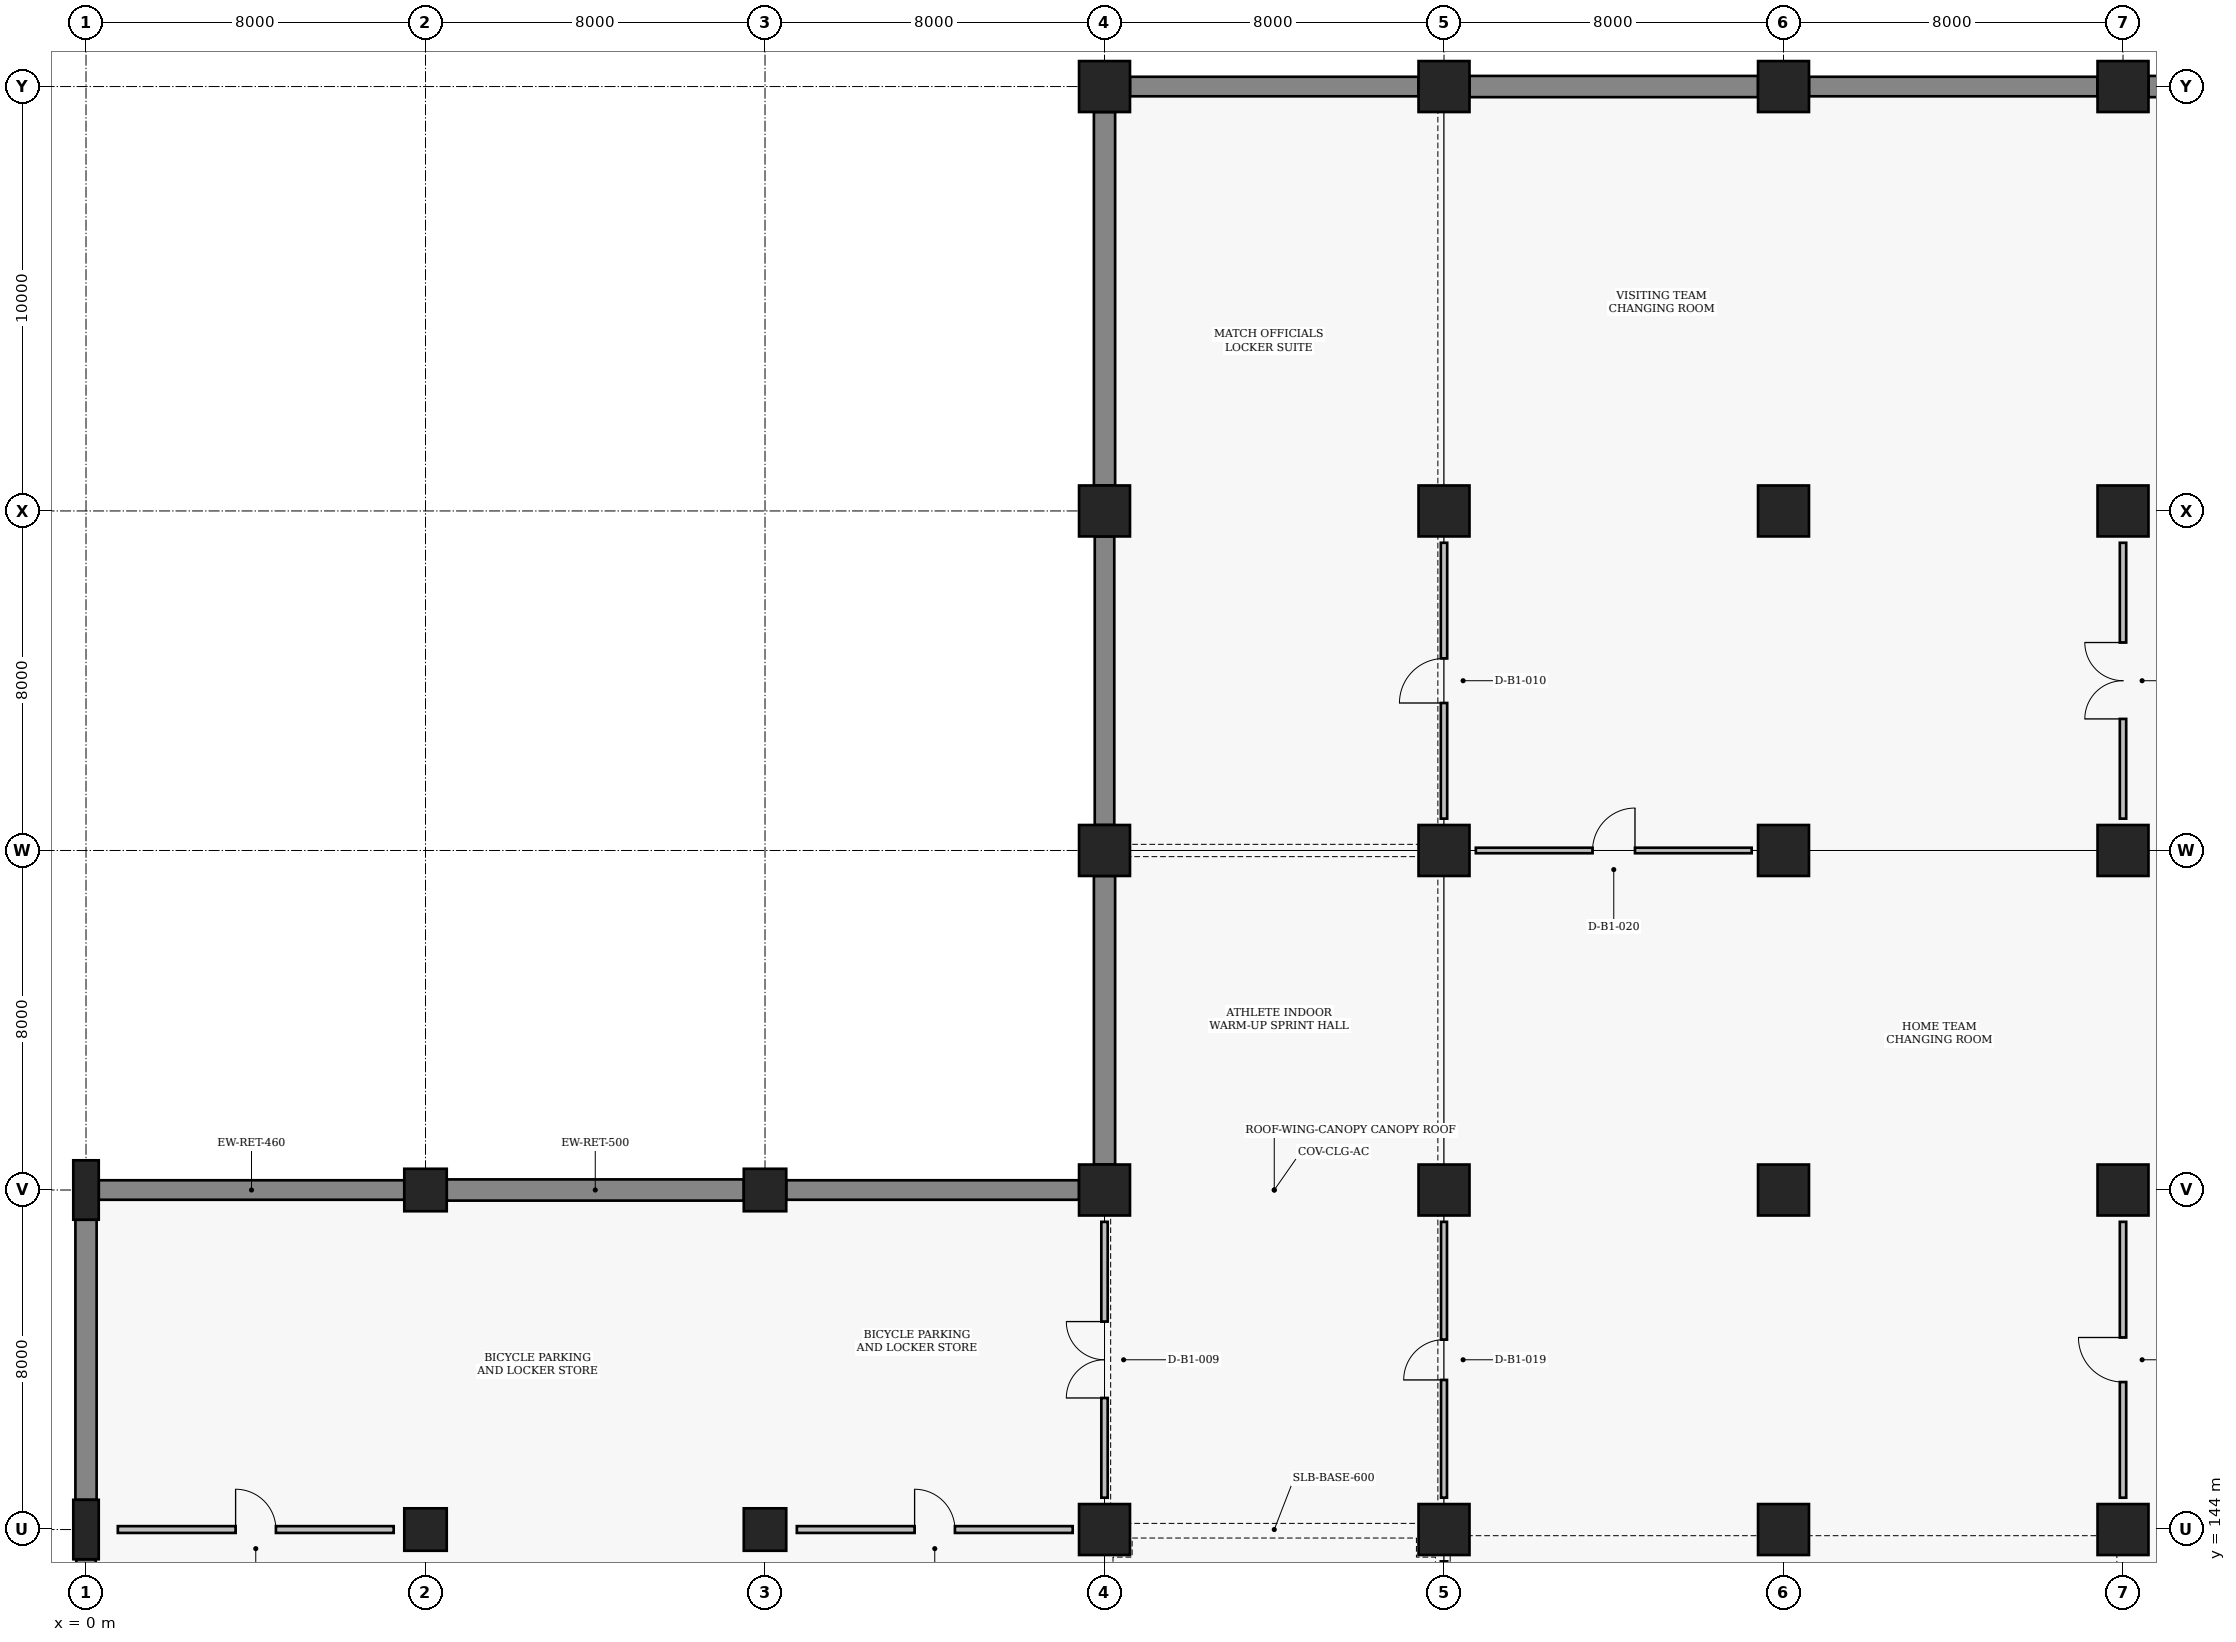
"""IFC4 building model, lengths in metres.
Left out: names, types, materials, properties, quantities, classifications, styles, units other than length and angle.
Written with IfcOpenShell. Run it as: python <this file> out.ifc"""

import sys

from ifc_helpers import new_model, si_unit, direction, frame, frame_2d, origin, origin_2d, place, context, subcontext, project, spatial, rectangle, circle, extrude, element, fill, save


model = new_model("IFC4")
c1 = context("Model", 3, precision=1e-05, world=origin(), true_north=direction((0.0, 1.0)))
c2 = subcontext(c1, "Body", "Model", "MODEL_VIEW")
j1 = project(units=[si_unit("LENGTHUNIT", "METRE"), si_unit("PLANEANGLEUNIT", "RADIAN")], contexts=[c1])
p1 = place(None, origin())
s1 = spatial("IfcSite", under=j1, at=p1, CompositionType="ELEMENT")
p2 = place(p1, origin())
s2 = spatial("IfcBuilding", under=s1, at=p2, CompositionType="ELEMENT")
p3 = place(p2, frame((0.0, 0.0, -5.4)))
s3 = spatial("IfcBuildingStorey", under=s2, at=p3, CompositionType="ELEMENT", Elevation=-5.4)
for number, where, z_axis, x_axis in (
    (1, (0.0, 144.0, 0.0), (0.0, 0.0, 1.0), (1.0, 0.0, 0.0)),
    (2, (0.0, 152.0, 0.0), (0.0, 0.0, 1.0), (1.0, 0.0, 0.0)),
):
    element("IfcColumn", number, at=place(p3, frame(where, z_axis=z_axis, x_axis=x_axis)), inside=s3, PredefinedType="PILASTER", context=c2, shape_type="SweptSolid", body=[
        extrude(rectangle(XDim=0.6, YDim=1.4, at=origin_2d()), origin(), (0.0, 0.0, 1.0), 5.4),
    ])
for number, where, z_axis, x_axis in (
    (3, (8.0, 144.0, 0.0), (0.0, 0.0, 1.0), (1.0, 0.0, 0.0)),
    (4, (8.0, 152.0, 0.0), (0.0, 0.0, 1.0), (1.0, 0.0, 0.0)),
    (5, (16.0, 144.0, 0.0), (0.0, 0.0, 1.0), (1.0, 0.0, 0.0)),
    (6, (16.0, 152.0, 0.0), (0.0, 0.0, 1.0), (1.0, 0.0, 0.0)),
):
    element("IfcColumn", number, at=place(p3, frame(where, z_axis=z_axis, x_axis=x_axis)), inside=s3, PredefinedType="COLUMN", context=c2, shape_type="SweptSolid", body=[
        extrude(circle(Radius=0.5, at=origin_2d()), origin(), (0.0, 0.0, 1.0), 5.4),
    ])
for number, where, z_axis, x_axis in (
    (7, (24.0, 144.0, 0.0), (0.0, 0.0, 1.0), (1.0, 0.0, 0.0)),
    (8, (24.0, 152.0, 0.0), (0.0, 0.0, 1.0), (1.0, 0.0, 0.0)),
    (9, (24.0, 160.0, 0.0), (0.0, 0.0, 1.0), (1.0, 0.0, 0.0)),
    (10, (24.0, 168.0, 0.0), (0.0, 0.0, 1.0), (1.0, 0.0, 0.0)),
    (11, (24.0, 178.0, 0.0), (0.0, 0.0, 1.0), (1.0, 0.0, 0.0)),
    (12, (32.0, 144.0, 0.0), (0.0, 0.0, 1.0), (1.0, 0.0, 0.0)),
    (13, (32.0, 152.0, 0.0), (0.0, 0.0, 1.0), (1.0, 0.0, 0.0)),
    (14, (32.0, 160.0, 0.0), (0.0, 0.0, 1.0), (1.0, 0.0, 0.0)),
    (15, (32.0, 168.0, 0.0), (0.0, 0.0, 1.0), (1.0, 0.0, 0.0)),
    (16, (32.0, 178.0, 0.0), (0.0, 0.0, 1.0), (1.0, 0.0, 0.0)),
    (17, (40.0, 144.0, 0.0), (0.0, 0.0, 1.0), (1.0, 0.0, 0.0)),
    (18, (40.0, 152.0, 0.0), (0.0, 0.0, 1.0), (1.0, 0.0, 0.0)),
    (19, (40.0, 160.0, 0.0), (0.0, 0.0, 1.0), (1.0, 0.0, 0.0)),
    (20, (40.0, 168.0, 0.0), (0.0, 0.0, 1.0), (1.0, 0.0, 0.0)),
    (21, (40.0, 178.0, 0.0), (0.0, 0.0, 1.0), (1.0, 0.0, 0.0)),
    (22, (48.0, 144.0, 0.0), (0.0, 0.0, 1.0), (1.0, 0.0, 0.0)),
    (23, (48.0, 152.0, 0.0), (0.0, 0.0, 1.0), (1.0, 0.0, 0.0)),
    (24, (48.0, 160.0, 0.0), (0.0, 0.0, 1.0), (1.0, 0.0, 0.0)),
    (25, (48.0, 168.0, 0.0), (0.0, 0.0, 1.0), (1.0, 0.0, 0.0)),
    (26, (48.0, 178.0, 0.0), (0.0, 0.0, 1.0), (1.0, 0.0, 0.0)),
):
    element("IfcColumn", number, at=place(p3, frame(where, z_axis=z_axis, x_axis=x_axis)), inside=s3, PredefinedType="COLUMN", context=c2, shape_type="SweptSolid", body=[
        extrude(rectangle(XDim=1.2, YDim=1.2, at=origin_2d()), origin(), (0.0, 0.0, 1.0), 5.4),
    ])
p4 = place(p3, frame((0.0, 136.7, 0.0), z_axis=(0.0, 0.0, 1.0), x_axis=(0.0, 1.0, 0.0)))
e27 = element("IfcWall", 27, at=p4, inside=s3, PredefinedType="STANDARD", context=c2, shape_type="SweptSolid", body=[
    extrude(rectangle(XDim=6.6, YDim=0.46, at=frame_2d((3.3, 0.0))), origin(), (0.0, 0.0, 1.0), 4.24),
])
p5 = place(p3, frame((0.3, 152.0, 0.0), z_axis=(0.0, 0.0, 1.0), x_axis=(1.0, 0.0, 0.0)))
e28 = element("IfcWall", 28, at=p5, inside=s3, PredefinedType="STANDARD", context=c2, shape_type="SweptSolid", body=[
    extrude(rectangle(XDim=7.2, YDim=0.46, at=frame_2d((3.6, 0.0))), origin(), (0.0, 0.0, 1.0), 4.24),
])
p6 = place(p3, frame((0.0, 144.7, 0.0), z_axis=(0.0, 0.0, 1.0), x_axis=(0.0, 1.0, 0.0)))
e29 = element("IfcWall", 29, at=p6, inside=s3, PredefinedType="STANDARD", context=c2, shape_type="SweptSolid", body=[
    extrude(rectangle(XDim=6.6, YDim=0.5, at=frame_2d((3.3, 0.0))), origin(), (0.0, 0.0, 1.0), 4.24),
])
p7 = place(p3, frame((8.5, 152.0, 0.0), z_axis=(0.0, 0.0, 1.0), x_axis=(1.0, 0.0, 0.0)))
e30 = element("IfcWall", 30, at=p7, inside=s3, PredefinedType="STANDARD", context=c2, shape_type="SweptSolid", body=[
    extrude(rectangle(XDim=7.0, YDim=0.5, at=frame_2d((3.5, 0.0))), origin(), (0.0, 0.0, 1.0), 4.34),
])
p8 = place(p3, frame((16.5, 152.0, 0.0), z_axis=(0.0, 0.0, 1.0), x_axis=(1.0, 0.0, 0.0)))
e31 = element("IfcWall", 31, at=p8, inside=s3, PredefinedType="STANDARD", context=c2, shape_type="SweptSolid", body=[
    extrude(rectangle(XDim=6.9, YDim=0.46, at=frame_2d((3.45, 0.0))), origin(), (0.0, 0.0, 1.0), 4.24),
])
p9 = place(p3, frame((24.0, 152.6, 0.0), z_axis=(0.0, 0.0, 1.0), x_axis=(0.0, 1.0, 0.0)))
e32 = element("IfcWall", 32, at=p9, inside=s3, PredefinedType="STANDARD", context=c2, shape_type="SweptSolid", body=[
    extrude(rectangle(XDim=6.8, YDim=0.5, at=frame_2d((3.4, 0.0))), origin(), (0.0, 0.0, 1.0), 4.24),
])
for number, where, z_axis, x_axis in (
    (33, (24.0, 160.6, 0.0), (0.0, 0.0, 1.0), (0.0, 1.0, 0.0)),
    (34, (24.6, 178.0, 0.0), (0.0, 0.0, 1.0), (1.0, 0.0, 0.0)),
):
    element("IfcWall", number, at=place(p3, frame(where, z_axis=z_axis, x_axis=x_axis)), inside=s3, PredefinedType="STANDARD", context=c2, shape_type="SweptSolid", body=[
        extrude(rectangle(XDim=6.8, YDim=0.46, at=frame_2d((3.4, 0.0))), origin(), (0.0, 0.0, 1.0), 4.24),
    ])
p10 = place(p3, frame((24.0, 168.6, 0.0), z_axis=(0.0, 0.0, 1.0), x_axis=(0.0, 1.0, 0.0)))
e35 = element("IfcWall", 35, at=p10, inside=s3, PredefinedType="STANDARD", context=c2, shape_type="SweptSolid", body=[
    extrude(rectangle(XDim=8.8, YDim=0.5, at=frame_2d((4.4, 0.0))), origin(), (0.0, 0.0, 1.0), 4.24),
])
p11 = place(p3, frame((32.6, 178.0, 0.0), z_axis=(0.0, 0.0, 1.0), x_axis=(1.0, 0.0, 0.0)))
e36 = element("IfcWall", 36, at=p11, inside=s3, PredefinedType="STANDARD", context=c2, shape_type="SweptSolid", body=[
    extrude(rectangle(XDim=6.8, YDim=0.5, at=frame_2d((3.4, 0.0))), origin(), (0.0, 0.0, 1.0), 4.34),
])
p12 = place(p3, frame((40.6, 178.0, 0.0), z_axis=(0.0, 0.0, 1.0), x_axis=(1.0, 0.0, 0.0)))
e37 = element("IfcWall", 37, at=p12, inside=s3, PredefinedType="STANDARD", context=c2, shape_type="SweptSolid", body=[
    extrude(rectangle(XDim=6.8, YDim=0.46, at=frame_2d((3.4, 0.0))), origin(), (0.0, 0.0, 1.0), 4.34),
])
p13 = place(p3, frame((48.6, 178.0, 0.0), z_axis=(0.0, 0.0, 1.0), x_axis=(1.0, 0.0, 0.0)))
e38 = element("IfcWall", 38, at=p13, inside=s3, PredefinedType="STANDARD", context=c2, shape_type="SweptSolid", body=[
    extrude(rectangle(XDim=6.8, YDim=0.5, at=frame_2d((3.4, 0.0))), origin(), (0.0, 0.0, 1.0), 4.34),
])
p14 = place(p3, frame((24.0, 144.75, 0.0), z_axis=(0.0, 0.0, 1.0), x_axis=(0.0, 1.0, 0.0)))
e39 = element("IfcWall", 39, at=p14, inside=s3, PredefinedType="PARTITIONING", context=c2, shape_type="SweptSolid", body=[
    extrude(rectangle(XDim=6.5, YDim=0.15, at=frame_2d((3.25, 0.0))), origin(), (0.0, 0.0, 1.0), 3.69),
])
p15 = place(p14, frame((2.35, 0.0, 0.0)))
e40 = element("IfcOpeningElement", 40, at=p15, cuts=e39, PredefinedType="OPENING", context=c2, shape_type="SweptSolid", body=[
    extrude(rectangle(XDim=1.8, YDim=2.3, at=frame_2d((0.9, 1.15))), frame((0.0, 0.085, 0.0), z_axis=(0.0, -1.0, 0.0), x_axis=(1.0, 0.0, 0.0)), (0.0, 0.0, 1.0), 0.17),
])
p16 = place(p3, frame((32.0, 160.75, 0.0), z_axis=(0.0, 0.0, 1.0), x_axis=(0.0, 1.0, 0.0)))
e41 = element("IfcWall", 41, at=p16, inside=s3, PredefinedType="PARTITIONING", context=c2, shape_type="SweptSolid", body=[
    extrude(rectangle(XDim=6.5, YDim=0.15, at=frame_2d((3.25, 0.0))), origin(), (0.0, 0.0, 1.0), 4.39),
])
p17 = place(p16, frame((2.725, 0.0, 0.0)))
e42 = element("IfcOpeningElement", 42, at=p17, cuts=e41, PredefinedType="OPENING", context=c2, shape_type="SweptSolid", body=[
    extrude(rectangle(XDim=1.05, YDim=2.15, at=frame_2d((0.525, 1.075))), frame((0.0, 0.085, 0.0), z_axis=(0.0, -1.0, 0.0), x_axis=(1.0, 0.0, 0.0)), (0.0, 0.0, 1.0), 0.17),
])
p18 = place(p3, frame((32.0, 136.75, 0.0), z_axis=(0.0, 0.0, 1.0), x_axis=(0.0, 1.0, 0.0)))
e43 = element("IfcWall", 43, at=p18, inside=s3, PredefinedType="PARTITIONING", context=c2, shape_type="SweptSolid", body=[
    extrude(rectangle(XDim=6.5, YDim=0.15, at=frame_2d((3.25, 0.0))), origin(), (0.0, 0.0, 1.0), 3.69),
])
p19 = place(p18, frame((2.35, 0.0, 0.0)))
e44 = element("IfcOpeningElement", 44, at=p19, cuts=e43, PredefinedType="OPENING", context=c2, shape_type="SweptSolid", body=[
    extrude(rectangle(XDim=1.8, YDim=2.3, at=frame_2d((0.9, 1.15))), frame((0.0, 0.085, 0.0), z_axis=(0.0, -1.0, 0.0), x_axis=(1.0, 0.0, 0.0)), (0.0, 0.0, 1.0), 0.17),
])
p20 = place(p3, frame((32.0, 144.75, 0.0), z_axis=(0.0, 0.0, 1.0), x_axis=(0.0, 1.0, 0.0)))
e45 = element("IfcWall", 45, at=p20, inside=s3, PredefinedType="MOVABLE", context=c2, shape_type="SweptSolid", body=[
    extrude(rectangle(XDim=6.5, YDim=0.14, at=frame_2d((3.25, 0.0))), origin(), (0.0, 0.0, 1.0), 3.69),
])
p21 = place(p20, frame((2.775, 0.0, 0.0)))
e46 = element("IfcOpeningElement", 46, at=p21, cuts=e45, PredefinedType="OPENING", context=c2, shape_type="SweptSolid", body=[
    extrude(rectangle(XDim=0.95, YDim=2.1, at=frame_2d((0.475, 1.05))), frame((0.0, 0.08, 0.0), z_axis=(0.0, -1.0, 0.0), x_axis=(1.0, 0.0, 0.0)), (0.0, 0.0, 1.0), 0.16),
])
p22 = place(p3, frame((32.75, 160.0, 0.0), z_axis=(0.0, 0.0, 1.0), x_axis=(1.0, 0.0, 0.0)))
e47 = element("IfcWall", 47, at=p22, inside=s3, PredefinedType="PARTITIONING", context=c2, shape_type="SweptSolid", body=[
    extrude(rectangle(XDim=6.5, YDim=0.13, at=frame_2d((3.25, 0.0))), origin(), (0.0, 0.0, 1.0), 4.49),
])
p23 = place(p22, frame((2.75, 0.0, 0.0)))
e48 = element("IfcOpeningElement", 48, at=p23, cuts=e47, PredefinedType="OPENING", context=c2, shape_type="SweptSolid", body=[
    extrude(rectangle(XDim=1.0, YDim=2.1, at=frame_2d((0.5, 1.05))), frame((0.0, 0.075, 0.0), z_axis=(0.0, -1.0, 0.0), x_axis=(1.0, 0.0, 0.0)), (0.0, 0.0, 1.0), 0.15),
])
p24 = place(p3, frame((48.0, 144.75, 0.0), z_axis=(0.0, 0.0, 1.0), x_axis=(0.0, 1.0, 0.0)))
e49 = element("IfcWall", 49, at=p24, inside=s3, PredefinedType="PARTITIONING", context=c2, shape_type="SweptSolid", body=[
    extrude(rectangle(XDim=6.5, YDim=0.15, at=frame_2d((3.25, 0.0))), origin(), (0.0, 0.0, 1.0), 4.39),
])
p25 = place(p24, frame((2.725, 0.0, 0.0)))
e50 = element("IfcOpeningElement", 50, at=p25, cuts=e49, PredefinedType="OPENING", context=c2, shape_type="SweptSolid", body=[
    extrude(rectangle(XDim=1.05, YDim=2.15, at=frame_2d((0.525, 1.075))), frame((0.0, 0.085, 0.0), z_axis=(0.0, -1.0, 0.0), x_axis=(1.0, 0.0, 0.0)), (0.0, 0.0, 1.0), 0.17),
])
p26 = place(p3, frame((48.0, 160.75, 0.0), z_axis=(0.0, 0.0, 1.0), x_axis=(0.0, 1.0, 0.0)))
e51 = element("IfcWall", 51, at=p26, inside=s3, PredefinedType="PARTITIONING", context=c2, shape_type="SweptSolid", body=[
    extrude(rectangle(XDim=6.5, YDim=0.15, at=frame_2d((3.25, 0.0))), origin(), (0.0, 0.0, 1.0), 4.39),
])
p27 = place(p26, frame((2.35, 0.0, 0.0)))
e52 = element("IfcOpeningElement", 52, at=p27, cuts=e51, PredefinedType="OPENING", context=c2, shape_type="SweptSolid", body=[
    extrude(rectangle(XDim=1.8, YDim=2.3, at=frame_2d((0.9, 1.15))), frame((0.0, 0.085, 0.0), z_axis=(0.0, -1.0, 0.0), x_axis=(1.0, 0.0, 0.0)), (0.0, 0.0, 1.0), 0.17),
])
p28 = place(p3, frame((0.75, 144.0, 0.0), z_axis=(0.0, 0.0, 1.0), x_axis=(1.0, 0.0, 0.0)))
e53 = element("IfcWall", 53, at=p28, inside=s3, PredefinedType="PARTITIONING", context=c2, shape_type="SweptSolid", body=[
    extrude(rectangle(XDim=6.5, YDim=0.16, at=frame_2d((3.25, 0.0))), origin(), (0.0, 0.0, 1.0), 4.49),
])
p29 = place(p28, frame((2.775, 0.0, 0.0)))
e54 = element("IfcOpeningElement", 54, at=p29, cuts=e53, PredefinedType="OPENING", context=c2, shape_type="SweptSolid", body=[
    extrude(rectangle(XDim=0.95, YDim=2.1, at=frame_2d((0.475, 1.05))), frame((0.0, 0.09, 0.0), z_axis=(0.0, -1.0, 0.0), x_axis=(1.0, 0.0, 0.0)), (0.0, 0.0, 1.0), 0.18),
])
p30 = place(p3, frame((16.75, 144.0, 0.0), z_axis=(0.0, 0.0, 1.0), x_axis=(1.0, 0.0, 0.0)))
e55 = element("IfcWall", 55, at=p30, inside=s3, PredefinedType="PARTITIONING", context=c2, shape_type="SweptSolid", body=[
    extrude(rectangle(XDim=6.5, YDim=0.16, at=frame_2d((3.25, 0.0))), origin(), (0.0, 0.0, 1.0), 3.69),
])
p31 = place(p30, frame((2.775, 0.0, 0.0)))
e56 = element("IfcOpeningElement", 56, at=p31, cuts=e55, PredefinedType="OPENING", context=c2, shape_type="SweptSolid", body=[
    extrude(rectangle(XDim=0.95, YDim=2.1, at=frame_2d((0.475, 1.05))), frame((0.0, 0.09, 0.0), z_axis=(0.0, -1.0, 0.0), x_axis=(1.0, 0.0, 0.0)), (0.0, 0.0, 1.0), 0.18),
])
p32 = place(p15, origin())
e57 = element("IfcDoor", 57, at=p32, inside=s3, OperationType="DOUBLE_SWING_LEFT", PredefinedType="DOOR", context=c2, shape_type="SweptSolid", body=[
    extrude(rectangle(XDim=1.8, YDim=2.3, at=frame_2d((0.9, 1.15))), frame((0.0, 0.025, 0.0), z_axis=(0.0, -1.0, 0.0), x_axis=(1.0, 0.0, 0.0)), (0.0, 0.0, 1.0), 0.05),
])
fill(e40, e57)
p33 = place(p17, origin())
e58 = element("IfcDoor", 58, at=p33, inside=s3, OperationType="SINGLE_SWING_LEFT", PredefinedType="DOOR", context=c2, shape_type="SweptSolid", body=[
    extrude(rectangle(XDim=1.05, YDim=2.15, at=frame_2d((0.525, 1.075))), frame((0.0, 0.025, 0.0), z_axis=(0.0, -1.0, 0.0), x_axis=(1.0, 0.0, 0.0)), (0.0, 0.0, 1.0), 0.05),
])
fill(e42, e58)
p34 = place(p21, origin())
e59 = element("IfcDoor", 59, at=p34, inside=s3, OperationType="SINGLE_SWING_LEFT", PredefinedType="DOOR", context=c2, shape_type="SweptSolid", body=[
    extrude(rectangle(XDim=0.95, YDim=2.1, at=frame_2d((0.475, 1.05))), frame((0.0, 0.025, 0.0), z_axis=(0.0, -1.0, 0.0), x_axis=(1.0, 0.0, 0.0)), (0.0, 0.0, 1.0), 0.05),
])
fill(e46, e59)
p35 = place(p23, origin())
e60 = element("IfcDoor", 60, at=p35, inside=s3, OperationType="SINGLE_SWING_RIGHT", PredefinedType="DOOR", context=c2, shape_type="SweptSolid", body=[
    extrude(rectangle(XDim=1.0, YDim=2.1, at=frame_2d((0.5, 1.05))), frame((0.0, 0.025, 0.0), z_axis=(0.0, -1.0, 0.0), x_axis=(1.0, 0.0, 0.0)), (0.0, 0.0, 1.0), 0.05),
])
fill(e48, e60)
p36 = place(p25, origin())
e61 = element("IfcDoor", 61, at=p36, inside=s3, OperationType="SINGLE_SWING_RIGHT", PredefinedType="DOOR", context=c2, shape_type="SweptSolid", body=[
    extrude(rectangle(XDim=1.05, YDim=2.15, at=frame_2d((0.525, 1.075))), frame((0.0, 0.025, 0.0), z_axis=(0.0, -1.0, 0.0), x_axis=(1.0, 0.0, 0.0)), (0.0, 0.0, 1.0), 0.05),
])
fill(e50, e61)
p37 = place(p27, origin())
e62 = element("IfcDoor", 62, at=p37, inside=s3, OperationType="DOUBLE_SWING_LEFT", PredefinedType="DOOR", context=c2, shape_type="SweptSolid", body=[
    extrude(rectangle(XDim=1.8, YDim=2.3, at=frame_2d((0.9, 1.15))), frame((0.0, 0.025, 0.0), z_axis=(0.0, -1.0, 0.0), x_axis=(1.0, 0.0, 0.0)), (0.0, 0.0, 1.0), 0.05),
])
fill(e52, e62)
p38 = place(p29, origin())
e63 = element("IfcDoor", 63, at=p38, inside=s3, OperationType="SINGLE_SWING_LEFT", PredefinedType="DOOR", context=c2, shape_type="SweptSolid", body=[
    extrude(rectangle(XDim=0.95, YDim=2.1, at=frame_2d((0.475, 1.05))), frame((0.0, 0.025, 0.0), z_axis=(0.0, -1.0, 0.0), x_axis=(1.0, 0.0, 0.0)), (0.0, 0.0, 1.0), 0.05),
])
fill(e54, e63)
p39 = place(p31, origin())
e64 = element("IfcDoor", 64, at=p39, inside=s3, OperationType="SINGLE_SWING_LEFT", PredefinedType="DOOR", context=c2, shape_type="SweptSolid", body=[
    extrude(rectangle(XDim=0.95, YDim=2.1, at=frame_2d((0.475, 1.05))), frame((0.0, 0.025, 0.0), z_axis=(0.0, -1.0, 0.0), x_axis=(1.0, 0.0, 0.0)), (0.0, 0.0, 1.0), 0.05),
])
fill(e56, e64)
save(model, sys.argv[1])
